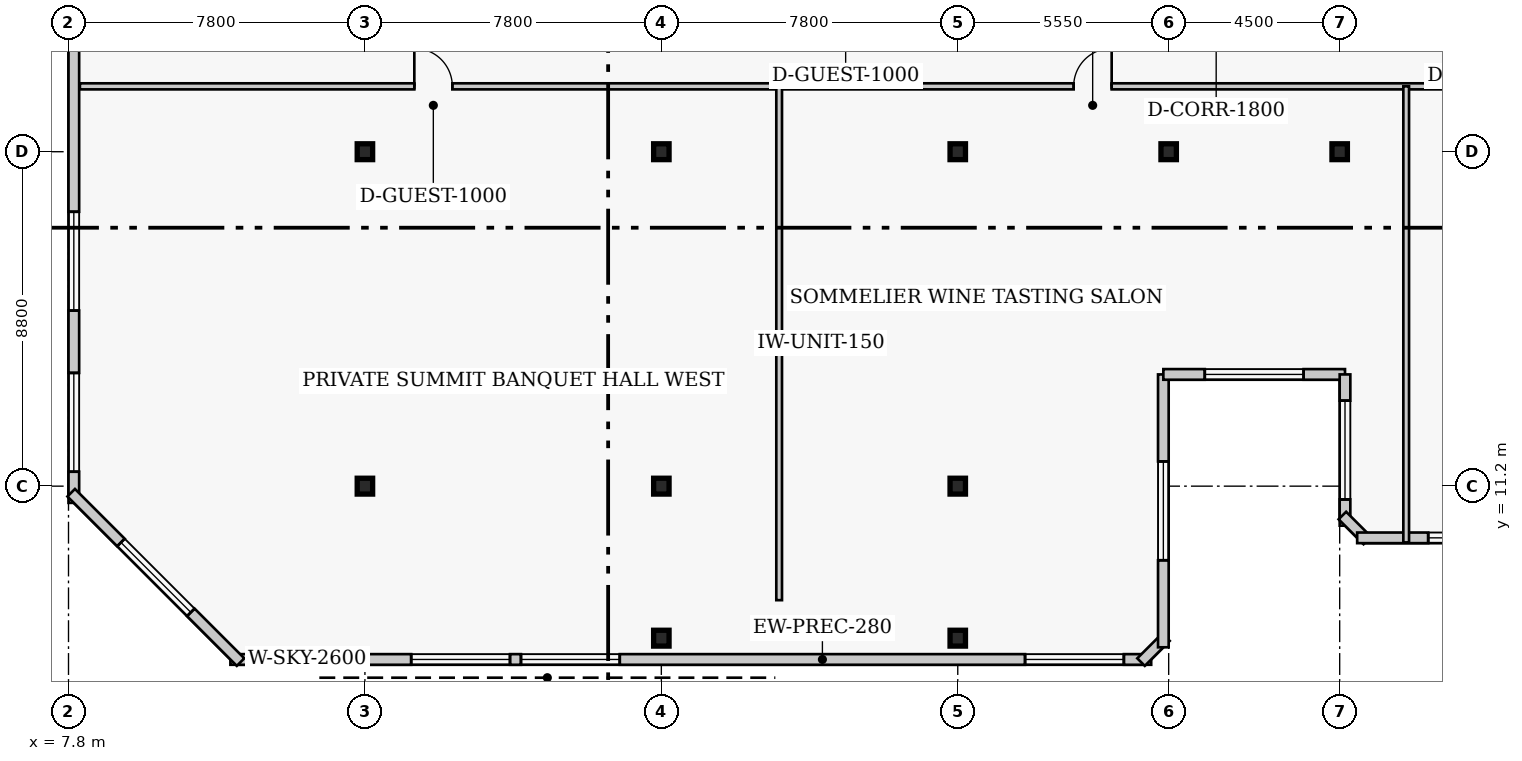
"""IFC4 building model, lengths in metres.
Left out: names, types, materials, properties, quantities, classifications, styles, units other than length and angle.
Written with IfcOpenShell. Run it as: python <this file> out.ifc"""

import sys

from ifc_helpers import new_model, si_unit, direction, frame, frame_2d, origin, origin_2d, place, context, subcontext, project, spatial, rectangle, i_section, extrude, element, fill, save


model = new_model("IFC4")
c1 = context("Model", 3, precision=1e-05, world=origin(), true_north=direction((0.0, 1.0)))
c2 = subcontext(c1, "Body", "Model", "MODEL_VIEW")
j1 = project(units=[si_unit("LENGTHUNIT", "METRE"), si_unit("PLANEANGLEUNIT", "RADIAN")], contexts=[c1])
p1 = place(None, origin())
s1 = spatial("IfcSite", under=j1, at=p1, CompositionType="ELEMENT")
p2 = place(p1, origin())
s2 = spatial("IfcBuilding", under=s1, at=p2, CompositionType="ELEMENT")
p3 = place(p2, frame((0.0, 0.0, 293.4)))
s3 = spatial("IfcBuildingStorey", under=s2, at=p3, CompositionType="ELEMENT", Elevation=293.4)
for number, where, z_axis, x_axis in (
    (1, (15.6, 11.2, 0.0), (0.0, 0.0, 1.0), (1.0, 0.0, 0.0)),
    (2, (15.6, 20.0, 0.0), (0.0, 0.0, 1.0), (1.0, 0.0, 0.0)),
    (3, (23.4, 11.2, 0.0), (0.0, 0.0, 1.0), (1.0, 0.0, 0.0)),
    (4, (23.4, 20.0, 0.0), (0.0, 0.0, 1.0), (1.0, 0.0, 0.0)),
    (5, (31.2, 11.2, 0.0), (0.0, 0.0, 1.0), (1.0, 0.0, 0.0)),
    (6, (31.2, 20.0, 0.0), (0.0, 0.0, 1.0), (1.0, 0.0, 0.0)),
    (7, (36.75, 20.0, 0.0), (0.0, 0.0, 1.0), (1.0, 0.0, 0.0)),
    (8, (41.25, 20.0, 0.0), (0.0, 0.0, 1.0), (1.0, 0.0, 0.0)),
    (9, (23.4, 7.2, 0.0), (0.0, 0.0, 1.0), (1.0, 0.0, 0.0)),
    (10, (31.2, 7.2, 0.0), (0.0, 0.0, 1.0), (1.0, 0.0, 0.0)),
):
    element("IfcColumn", number, at=place(p3, frame(where, z_axis=z_axis, x_axis=x_axis)), inside=s3, PredefinedType="COLUMN", context=c2, shape_type="SweptSolid", body=[
        extrude(i_section(OverallWidth=0.406, OverallDepth=0.417, WebThickness=0.03, FlangeThickness=0.048, FilletRadius=0.017, at=origin_2d()), origin(), (0.0, 0.0, 1.0), 4.0),
    ])
p4 = place(p3, frame((12.06, 6.64, 0.0), z_axis=(0.0, 0.0, 1.0), x_axis=(1.0, 0.0, 0.0)))
e11 = element("IfcWall", 11, at=p4, inside=s3, PredefinedType="SOLIDWALL", context=c2, shape_type="SweptSolid", body=[
    extrude(rectangle(XDim=24.23, YDim=0.28, at=frame_2d((12.115, 0.0))), origin(), (0.0, 0.0, 1.0), 3.71),
])
p5 = place(p4, frame((0.719, 0.0, 0.65)))
e12 = element("IfcOpeningElement", 12, at=p5, cuts=e11, PredefinedType="OPENING", context=c2, shape_type="SweptSolid", body=[
    extrude(rectangle(XDim=2.6, YDim=2.2, at=frame_2d((1.3, 1.1))), frame((0.0, 0.15, 0.0), z_axis=(0.0, -1.0, 0.0), x_axis=(1.0, 0.0, 0.0)), (0.0, 0.0, 1.0), 0.3),
])
p6 = place(p4, frame((4.758, 0.0, 0.65)))
e13 = element("IfcOpeningElement", 13, at=p6, cuts=e11, PredefinedType="OPENING", context=c2, shape_type="SweptSolid", body=[
    extrude(rectangle(XDim=2.6, YDim=2.2, at=frame_2d((1.3, 1.1))), frame((0.0, 0.15, 0.0), z_axis=(0.0, -1.0, 0.0), x_axis=(1.0, 0.0, 0.0)), (0.0, 0.0, 1.0), 0.3),
])
p7 = place(p4, frame((7.646, 0.0, 0.65)))
e14 = element("IfcOpeningElement", 14, at=p7, cuts=e11, PredefinedType="OPENING", context=c2, shape_type="SweptSolid", body=[
    extrude(rectangle(XDim=2.6, YDim=2.2, at=frame_2d((1.3, 1.1))), frame((0.0, 0.15, 0.0), z_axis=(0.0, -1.0, 0.0), x_axis=(1.0, 0.0, 0.0)), (0.0, 0.0, 1.0), 0.3),
])
p8 = place(p4, frame((20.911, 0.0, 0.65)))
e15 = element("IfcOpeningElement", 15, at=p8, cuts=e11, PredefinedType="OPENING", context=c2, shape_type="SweptSolid", body=[
    extrude(rectangle(XDim=2.6, YDim=2.2, at=frame_2d((1.3, 1.1))), frame((0.0, 0.15, 0.0), z_axis=(0.0, -1.0, 0.0), x_axis=(1.0, 0.0, 0.0)), (0.0, 0.0, 1.0), 0.3),
])
p9 = place(p3, frame((36.023, 6.571, 0.0), z_axis=(0.0, 0.0, 1.0), x_axis=(0.707106781187, 0.707106781187, 0.0)))
e16 = element("IfcWall", 16, at=p9, inside=s3, PredefinedType="SOLIDWALL", context=c2, shape_type="SweptSolid", body=[
    extrude(rectangle(XDim=0.928, YDim=0.28, at=frame_2d((0.464, 0.0))), origin(), (0.0, 0.0, 1.0), 3.71),
])
p10 = place(p3, frame((36.61, 6.96, 0.0), z_axis=(0.0, 0.0, 1.0), x_axis=(0.0, 1.0, 0.0)))
e17 = element("IfcWall", 17, at=p10, inside=s3, PredefinedType="SOLIDWALL", context=c2, shape_type="SweptSolid", body=[
    extrude(rectangle(XDim=7.18, YDim=0.28, at=frame_2d((3.59, 0.0))), origin(), (0.0, 0.0, 1.0), 3.71),
])
p11 = place(p10, frame((2.29, 0.0, 0.65)))
e18 = element("IfcOpeningElement", 18, at=p11, cuts=e17, PredefinedType="OPENING", context=c2, shape_type="SweptSolid", body=[
    extrude(rectangle(XDim=2.6, YDim=2.2, at=frame_2d((1.3, 1.1))), frame((0.0, 0.15, 0.0), z_axis=(0.0, -1.0, 0.0), x_axis=(1.0, 0.0, 0.0)), (0.0, 0.0, 1.0), 0.3),
])
p12 = place(p3, frame((36.61, 14.14, 0.0), z_axis=(0.0, 0.0, 1.0), x_axis=(1.0, 0.0, 0.0)))
e19 = element("IfcWall", 19, at=p12, inside=s3, PredefinedType="SOLIDWALL", context=c2, shape_type="SweptSolid", body=[
    extrude(rectangle(XDim=4.78, YDim=0.28, at=frame_2d((2.39, 0.0))), origin(), (0.0, 0.0, 1.0), 3.71),
])
p13 = place(p12, frame((1.09, 0.0, 0.65)))
e20 = element("IfcOpeningElement", 20, at=p13, cuts=e19, PredefinedType="OPENING", context=c2, shape_type="SweptSolid", body=[
    extrude(rectangle(XDim=2.6, YDim=2.2, at=frame_2d((1.3, 1.1))), frame((0.0, 0.15, 0.0), z_axis=(0.0, -1.0, 0.0), x_axis=(1.0, 0.0, 0.0)), (0.0, 0.0, 1.0), 0.3),
])
p14 = place(p3, frame((41.39, 14.14, 0.0), z_axis=(0.0, 0.0, 1.0), x_axis=(0.0, -1.0, 0.0)))
e21 = element("IfcWall", 21, at=p14, inside=s3, PredefinedType="SOLIDWALL", context=c2, shape_type="SweptSolid", body=[
    extrude(rectangle(XDim=3.98, YDim=0.28, at=frame_2d((1.99, 0.0))), origin(), (0.0, 0.0, 1.0), 3.71),
])
p15 = place(p14, frame((0.69, 0.0, 0.65)))
e22 = element("IfcOpeningElement", 22, at=p15, cuts=e21, PredefinedType="OPENING", context=c2, shape_type="SweptSolid", body=[
    extrude(rectangle(XDim=2.6, YDim=2.2, at=frame_2d((1.3, 1.1))), frame((0.0, 0.15, 0.0), z_axis=(0.0, -1.0, 0.0), x_axis=(1.0, 0.0, 0.0)), (0.0, 0.0, 1.0), 0.3),
])
p16 = place(p3, frame((41.321, 10.427, 0.0), z_axis=(0.0, 0.0, 1.0), x_axis=(0.707106781187, -0.707106781187, 0.0)))
e23 = element("IfcWall", 23, at=p16, inside=s3, PredefinedType="SOLIDWALL", context=c2, shape_type="SweptSolid", body=[
    extrude(rectangle(XDim=0.928, YDim=0.28, at=frame_2d((0.464, 0.0))), origin(), (0.0, 0.0, 1.0), 3.71),
])
p17 = place(p3, frame((41.71, 9.84, 0.0), z_axis=(0.0, 0.0, 1.0), x_axis=(1.0, 0.0, 0.0)))
e24 = element("IfcWall", 24, at=p17, inside=s3, PredefinedType="SOLIDWALL", context=c2, shape_type="SweptSolid", body=[
    extrude(rectangle(XDim=24.23, YDim=0.28, at=frame_2d((12.115, 0.0))), origin(), (0.0, 0.0, 1.0), 3.71),
])
p18 = place(p17, frame((1.869, 0.0, 0.65)))
e25 = element("IfcOpeningElement", 25, at=p18, cuts=e24, PredefinedType="OPENING", context=c2, shape_type="SweptSolid", body=[
    extrude(rectangle(XDim=2.6, YDim=2.2, at=frame_2d((1.3, 1.1))), frame((0.0, 0.15, 0.0), z_axis=(0.0, -1.0, 0.0), x_axis=(1.0, 0.0, 0.0)), (0.0, 0.0, 1.0), 0.3),
])
p19 = place(p17, frame((5.907, 0.0, 0.65)))
e26 = element("IfcOpeningElement", 26, at=p19, cuts=e24, PredefinedType="OPENING", context=c2, shape_type="SweptSolid", body=[
    extrude(rectangle(XDim=2.6, YDim=2.2, at=frame_2d((1.3, 1.1))), frame((0.0, 0.15, 0.0), z_axis=(0.0, -1.0, 0.0), x_axis=(1.0, 0.0, 0.0)), (0.0, 0.0, 1.0), 0.3),
])
p20 = place(p17, frame((8.796, 0.0, 0.65)))
e27 = element("IfcOpeningElement", 27, at=p20, cuts=e24, PredefinedType="OPENING", context=c2, shape_type="SweptSolid", body=[
    extrude(rectangle(XDim=2.6, YDim=2.2, at=frame_2d((1.3, 1.1))), frame((0.0, 0.15, 0.0), z_axis=(0.0, -1.0, 0.0), x_axis=(1.0, 0.0, 0.0)), (0.0, 0.0, 1.0), 0.3),
])
p21 = place(p17, frame((13.484, 0.0, 0.65)))
e28 = element("IfcOpeningElement", 28, at=p21, cuts=e24, PredefinedType="OPENING", context=c2, shape_type="SweptSolid", body=[
    extrude(rectangle(XDim=2.6, YDim=2.2, at=frame_2d((1.3, 1.1))), frame((0.0, 0.15, 0.0), z_axis=(0.0, -1.0, 0.0), x_axis=(1.0, 0.0, 0.0)), (0.0, 0.0, 1.0), 0.3),
])
p22 = place(p17, frame((16.873, 0.0, 0.65)))
e29 = element("IfcOpeningElement", 29, at=p22, cuts=e24, PredefinedType="OPENING", context=c2, shape_type="SweptSolid", body=[
    extrude(rectangle(XDim=2.6, YDim=2.2, at=frame_2d((1.3, 1.1))), frame((0.0, 0.15, 0.0), z_axis=(0.0, -1.0, 0.0), x_axis=(1.0, 0.0, 0.0)), (0.0, 0.0, 1.0), 0.3),
])
p23 = place(p3, frame((7.94, 40.44, 0.0), z_axis=(0.0, 0.0, 1.0), x_axis=(0.0, -1.0, 0.0)))
e30 = element("IfcWall", 30, at=p23, inside=s3, PredefinedType="SOLIDWALL", context=c2, shape_type="SweptSolid", body=[
    extrude(rectangle(XDim=29.68, YDim=0.28, at=frame_2d((14.84, 0.0))), origin(), (0.0, 0.0, 1.0), 3.71),
])
p24 = place(p23, frame((0.82, 0.0, 0.65)))
e31 = element("IfcOpeningElement", 31, at=p24, cuts=e30, PredefinedType="OPENING", context=c2, shape_type="SweptSolid", body=[
    extrude(rectangle(XDim=2.6, YDim=2.2, at=frame_2d((1.3, 1.1))), frame((0.0, 0.15, 0.0), z_axis=(0.0, -1.0, 0.0), x_axis=(1.0, 0.0, 0.0)), (0.0, 0.0, 1.0), 0.3),
])
p25 = place(p23, frame((5.06, 0.0, 0.65)))
e32 = element("IfcOpeningElement", 32, at=p25, cuts=e30, PredefinedType="OPENING", context=c2, shape_type="SweptSolid", body=[
    extrude(rectangle(XDim=2.6, YDim=2.2, at=frame_2d((1.3, 1.1))), frame((0.0, 0.15, 0.0), z_axis=(0.0, -1.0, 0.0), x_axis=(1.0, 0.0, 0.0)), (0.0, 0.0, 1.0), 0.3),
])
p26 = place(p23, frame((9.3, 0.0, 0.65)))
e33 = element("IfcOpeningElement", 33, at=p26, cuts=e30, PredefinedType="OPENING", context=c2, shape_type="SweptSolid", body=[
    extrude(rectangle(XDim=2.6, YDim=2.2, at=frame_2d((1.3, 1.1))), frame((0.0, 0.15, 0.0), z_axis=(0.0, -1.0, 0.0), x_axis=(1.0, 0.0, 0.0)), (0.0, 0.0, 1.0), 0.3),
])
p27 = place(p23, frame((13.54, 0.0, 0.65)))
e34 = element("IfcOpeningElement", 34, at=p27, cuts=e30, PredefinedType="OPENING", context=c2, shape_type="SweptSolid", body=[
    extrude(rectangle(XDim=2.6, YDim=2.2, at=frame_2d((1.3, 1.1))), frame((0.0, 0.15, 0.0), z_axis=(0.0, -1.0, 0.0), x_axis=(1.0, 0.0, 0.0)), (0.0, 0.0, 1.0), 0.3),
])
p28 = place(p23, frame((22.02, 0.0, 0.65)))
e35 = element("IfcOpeningElement", 35, at=p28, cuts=e30, PredefinedType="OPENING", context=c2, shape_type="SweptSolid", body=[
    extrude(rectangle(XDim=2.6, YDim=2.2, at=frame_2d((1.3, 1.1))), frame((0.0, 0.15, 0.0), z_axis=(0.0, -1.0, 0.0), x_axis=(1.0, 0.0, 0.0)), (0.0, 0.0, 1.0), 0.3),
])
p29 = place(p23, frame((26.26, 0.0, 0.65)))
e36 = element("IfcOpeningElement", 36, at=p29, cuts=e30, PredefinedType="OPENING", context=c2, shape_type="SweptSolid", body=[
    extrude(rectangle(XDim=2.6, YDim=2.2, at=frame_2d((1.3, 1.1))), frame((0.0, 0.15, 0.0), z_axis=(0.0, -1.0, 0.0), x_axis=(1.0, 0.0, 0.0)), (0.0, 0.0, 1.0), 0.3),
])
p30 = place(p3, frame((7.871, 11.027, 0.0), z_axis=(0.0, 0.0, 1.0), x_axis=(0.707126148934, -0.707087412908, 0.0)))
e37 = element("IfcWall", 37, at=p30, inside=s3, PredefinedType="SOLIDWALL", context=c2, shape_type="SweptSolid", body=[
    extrude(rectangle(XDim=6.303, YDim=0.28, at=frame_2d((3.151, 0.0))), origin(), (0.0, 0.0, 1.0), 3.71),
])
p31 = place(p30, frame((1.851, 0.0, 0.65)))
e38 = element("IfcOpeningElement", 38, at=p31, cuts=e37, PredefinedType="OPENING", context=c2, shape_type="SweptSolid", body=[
    extrude(rectangle(XDim=2.6, YDim=2.2, at=frame_2d((1.3, 1.1))), frame((0.0, 0.15, 0.0), z_axis=(0.0, -1.0, 0.0), x_axis=(1.0, 0.0, 0.0)), (0.0, 0.0, 1.0), 0.3),
])
p32 = place(p3, frame((8.1, 21.72, 0.0), z_axis=(0.0, 0.0, 1.0), x_axis=(1.0, 0.0, 0.0)))
e39 = element("IfcWall", 39, at=p32, inside=s3, PredefinedType="PARTITIONING", context=c2, shape_type="SweptSolid", body=[
    extrude(rectangle(XDim=61.8, YDim=0.16, at=frame_2d((30.9, 0.0))), origin(), (0.0, 0.0, 1.0), 3.71),
])
p33 = place(p32, frame((8.8, 0.0, 0.0)))
e40 = element("IfcOpeningElement", 40, at=p33, cuts=e39, PredefinedType="OPENING", context=c2, shape_type="SweptSolid", body=[
    extrude(rectangle(XDim=1.0, YDim=2.15, at=frame_2d((0.5, 1.075))), frame((0.0, 0.09, 0.0), z_axis=(0.0, -1.0, 0.0), x_axis=(1.0, 0.0, 0.0)), (0.0, 0.0, 1.0), 0.18),
])
p34 = place(p32, frame((26.15, 0.0, 0.0)))
e41 = element("IfcOpeningElement", 41, at=p34, cuts=e39, PredefinedType="OPENING", context=c2, shape_type="SweptSolid", body=[
    extrude(rectangle(XDim=1.0, YDim=2.15, at=frame_2d((0.5, 1.075))), frame((0.0, 0.09, 0.0), z_axis=(0.0, -1.0, 0.0), x_axis=(1.0, 0.0, 0.0)), (0.0, 0.0, 1.0), 0.18),
])
p35 = place(p32, frame((47.75, 0.0, 0.0)))
e42 = element("IfcOpeningElement", 42, at=p35, cuts=e39, PredefinedType="OPENING", context=c2, shape_type="SweptSolid", body=[
    extrude(rectangle(XDim=1.0, YDim=2.15, at=frame_2d((0.5, 1.075))), frame((0.0, 0.09, 0.0), z_axis=(0.0, -1.0, 0.0), x_axis=(1.0, 0.0, 0.0)), (0.0, 0.0, 1.0), 0.18),
])
p36 = place(p3, frame((26.5, 8.2, 0.0), z_axis=(0.0, 0.0, 1.0), x_axis=(0.0, 1.0, 0.0)))
e43 = element("IfcWall", 43, at=p36, inside=s3, PredefinedType="PARTITIONING", context=c2, shape_type="SweptSolid", body=[
    extrude(rectangle(XDim=13.52, YDim=0.15, at=frame_2d((6.76, 0.0))), origin(), (0.0, 0.0, 1.0), 3.306),
])
p37 = place(p3, frame((43.0, 9.72, 0.0), z_axis=(0.0, 0.0, 1.0), x_axis=(0.0, 1.0, 0.0)))
e44 = element("IfcWall", 44, at=p37, inside=s3, PredefinedType="PARTITIONING", context=c2, shape_type="SweptSolid", body=[
    extrude(rectangle(XDim=12.0, YDim=0.15, at=frame_2d((6.0, 0.0))), origin(), (0.0, 0.0, 1.0), 3.71),
])
p38 = place(p5, origin())
e45 = element("IfcWindow", 45, at=p38, inside=s3, PartitioningType="SINGLE_PANEL", PredefinedType="WINDOW", context=c2, shape_type="SweptSolid", body=[
    extrude(rectangle(XDim=2.6, YDim=2.2, at=frame_2d((1.3, 1.1))), frame((0.0, 0.03, 0.0), z_axis=(0.0, -1.0, 0.0), x_axis=(1.0, 0.0, 0.0)), (0.0, 0.0, 1.0), 0.06),
])
fill(e12, e45)
p39 = place(p6, origin())
e46 = element("IfcWindow", 46, at=p39, inside=s3, PartitioningType="SINGLE_PANEL", PredefinedType="WINDOW", context=c2, shape_type="SweptSolid", body=[
    extrude(rectangle(XDim=2.6, YDim=2.2, at=frame_2d((1.3, 1.1))), frame((0.0, 0.03, 0.0), z_axis=(0.0, -1.0, 0.0), x_axis=(1.0, 0.0, 0.0)), (0.0, 0.0, 1.0), 0.06),
])
fill(e13, e46)
p40 = place(p7, origin())
e47 = element("IfcWindow", 47, at=p40, inside=s3, PartitioningType="SINGLE_PANEL", PredefinedType="WINDOW", context=c2, shape_type="SweptSolid", body=[
    extrude(rectangle(XDim=2.6, YDim=2.2, at=frame_2d((1.3, 1.1))), frame((0.0, 0.03, 0.0), z_axis=(0.0, -1.0, 0.0), x_axis=(1.0, 0.0, 0.0)), (0.0, 0.0, 1.0), 0.06),
])
fill(e14, e47)
p41 = place(p8, origin())
e48 = element("IfcWindow", 48, at=p41, inside=s3, PartitioningType="SINGLE_PANEL", PredefinedType="WINDOW", context=c2, shape_type="SweptSolid", body=[
    extrude(rectangle(XDim=2.6, YDim=2.2, at=frame_2d((1.3, 1.1))), frame((0.0, 0.03, 0.0), z_axis=(0.0, -1.0, 0.0), x_axis=(1.0, 0.0, 0.0)), (0.0, 0.0, 1.0), 0.06),
])
fill(e15, e48)
p42 = place(p11, origin())
e49 = element("IfcWindow", 49, at=p42, inside=s3, PartitioningType="SINGLE_PANEL", PredefinedType="WINDOW", context=c2, shape_type="SweptSolid", body=[
    extrude(rectangle(XDim=2.6, YDim=2.2, at=frame_2d((1.3, 1.1))), frame((0.0, 0.03, 0.0), z_axis=(0.0, -1.0, 0.0), x_axis=(1.0, 0.0, 0.0)), (0.0, 0.0, 1.0), 0.06),
])
fill(e18, e49)
p43 = place(p13, origin())
e50 = element("IfcWindow", 50, at=p43, inside=s3, PartitioningType="SINGLE_PANEL", PredefinedType="WINDOW", context=c2, shape_type="SweptSolid", body=[
    extrude(rectangle(XDim=2.6, YDim=2.2, at=frame_2d((1.3, 1.1))), frame((0.0, 0.03, 0.0), z_axis=(0.0, -1.0, 0.0), x_axis=(1.0, 0.0, 0.0)), (0.0, 0.0, 1.0), 0.06),
])
fill(e20, e50)
p44 = place(p15, origin())
e51 = element("IfcWindow", 51, at=p44, inside=s3, PartitioningType="SINGLE_PANEL", PredefinedType="WINDOW", context=c2, shape_type="SweptSolid", body=[
    extrude(rectangle(XDim=2.6, YDim=2.2, at=frame_2d((1.3, 1.1))), frame((0.0, 0.03, 0.0), z_axis=(0.0, -1.0, 0.0), x_axis=(1.0, 0.0, 0.0)), (0.0, 0.0, 1.0), 0.06),
])
fill(e22, e51)
p45 = place(p18, origin())
e52 = element("IfcWindow", 52, at=p45, inside=s3, PartitioningType="SINGLE_PANEL", PredefinedType="WINDOW", context=c2, shape_type="SweptSolid", body=[
    extrude(rectangle(XDim=2.6, YDim=2.2, at=frame_2d((1.3, 1.1))), frame((0.0, 0.03, 0.0), z_axis=(0.0, -1.0, 0.0), x_axis=(1.0, 0.0, 0.0)), (0.0, 0.0, 1.0), 0.06),
])
fill(e25, e52)
p46 = place(p28, origin())
e53 = element("IfcWindow", 53, at=p46, inside=s3, PartitioningType="SINGLE_PANEL", PredefinedType="WINDOW", context=c2, shape_type="SweptSolid", body=[
    extrude(rectangle(XDim=2.6, YDim=2.2, at=frame_2d((1.3, 1.1))), frame((0.0, 0.03, 0.0), z_axis=(0.0, -1.0, 0.0), x_axis=(1.0, 0.0, 0.0)), (0.0, 0.0, 1.0), 0.06),
])
fill(e35, e53)
p47 = place(p29, origin())
e54 = element("IfcWindow", 54, at=p47, inside=s3, PartitioningType="SINGLE_PANEL", PredefinedType="WINDOW", context=c2, shape_type="SweptSolid", body=[
    extrude(rectangle(XDim=2.6, YDim=2.2, at=frame_2d((1.3, 1.1))), frame((0.0, 0.03, 0.0), z_axis=(0.0, -1.0, 0.0), x_axis=(1.0, 0.0, 0.0)), (0.0, 0.0, 1.0), 0.06),
])
fill(e36, e54)
p48 = place(p31, origin())
e55 = element("IfcWindow", 55, at=p48, inside=s3, PartitioningType="SINGLE_PANEL", PredefinedType="WINDOW", context=c2, shape_type="SweptSolid", body=[
    extrude(rectangle(XDim=2.6, YDim=2.2, at=frame_2d((1.3, 1.1))), frame((0.0, 0.03, 0.0), z_axis=(0.0, -1.0, 0.0), x_axis=(1.0, 0.0, 0.0)), (0.0, 0.0, 1.0), 0.06),
])
fill(e38, e55)
p49 = place(p33, origin())
e56 = element("IfcDoor", 56, at=p49, inside=s3, OperationType="SINGLE_SWING_LEFT", PredefinedType="DOOR", context=c2, shape_type="SweptSolid", body=[
    extrude(rectangle(XDim=1.0, YDim=2.15, at=frame_2d((0.5, 1.075))), frame((0.0, 0.025, 0.0), z_axis=(0.0, -1.0, 0.0), x_axis=(1.0, 0.0, 0.0)), (0.0, 0.0, 1.0), 0.05),
])
fill(e40, e56)
p50 = place(p34, origin())
e57 = element("IfcDoor", 57, at=p50, inside=s3, OperationType="SINGLE_SWING_RIGHT", PredefinedType="DOOR", context=c2, shape_type="SweptSolid", body=[
    extrude(rectangle(XDim=1.0, YDim=2.15, at=frame_2d((0.5, 1.075))), frame((0.0, 0.025, 0.0), z_axis=(0.0, -1.0, 0.0), x_axis=(1.0, 0.0, 0.0)), (0.0, 0.0, 1.0), 0.05),
])
fill(e41, e57)
save(model, sys.argv[1])
